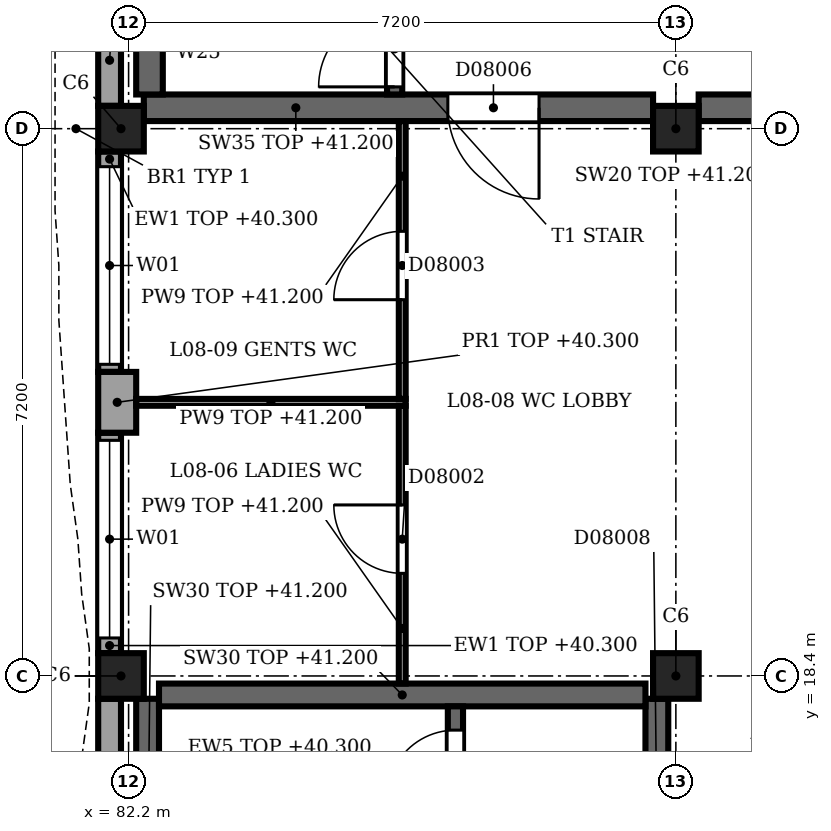
"""IFC4 building model, lengths in metres.
Left out: names, types, materials, properties, quantities, classifications, styles, units other than length and angle.
Written with IfcOpenShell. Run it as: python <this file> out.ifc"""

import sys

from ifc_helpers import new_model, si_unit, direction, frame, frame_2d, origin, origin_2d, place, context, subcontext, project, spatial, rectangle, extrude, element, fill, save


model = new_model("IFC4")
c1 = context("Model", 3, precision=1e-05, world=origin(), true_north=direction((0.0, 1.0)))
c2 = subcontext(c1, "Body", "Model", "MODEL_VIEW")
j1 = project(units=[si_unit("LENGTHUNIT", "METRE"), si_unit("PLANEANGLEUNIT", "RADIAN")], contexts=[c1])
p1 = place(None, origin())
s1 = spatial("IfcSite", under=j1, at=p1, CompositionType="ELEMENT")
p2 = place(p1, origin())
s2 = spatial("IfcBuilding", under=s1, at=p2, CompositionType="ELEMENT")
p3 = place(p2, frame((0.0, 0.0, 36.9)))
s3 = spatial("IfcBuildingStorey", under=s2, at=p3, CompositionType="ELEMENT", Elevation=36.9)
for number, where, z_axis, x_axis in (
    (1, (82.1, 18.4, 0.0), (0.0, 0.0, 1.0), (1.0, 0.0, 0.0)),
    (2, (82.1, 25.6, 0.0), (0.0, 0.0, 1.0), (1.0, 0.0, 0.0)),
    (3, (89.4, 18.4, 0.0), (0.0, 0.0, 1.0), (1.0, 0.0, 0.0)),
    (4, (89.4, 25.6, 0.0), (0.0, 0.0, 1.0), (1.0, 0.0, 0.0)),
):
    element("IfcColumn", number, at=place(p3, frame(where, z_axis=z_axis, x_axis=x_axis)), inside=s3, PredefinedType="COLUMN", context=c2, shape_type="SweptSolid", body=[
        extrude(rectangle(XDim=0.6, YDim=0.6, at=origin_2d()), origin(), (0.0, 0.0, 1.0), 4.5),
    ])
p4 = place(p3, frame((82.05, 21.6, 0.0), z_axis=(0.0, 0.0, 1.0), x_axis=(0.0, 1.0, 0.0)))
e5 = element("IfcWall", 5, at=p4, inside=s3, PredefinedType="SOLIDWALL", context=c2, shape_type="SweptSolid", body=[
    extrude(rectangle(XDim=0.8, YDim=0.5, at=frame_2d((0.4, 0.0))), origin(), (0.0, 0.0, 1.0), 3.4),
])
p5 = place(p3, frame((81.95, 15.2, 0.0), z_axis=(0.0, 0.0, 1.0), x_axis=(0.0, 1.0, 0.0)))
e6 = element("IfcWall", 6, at=p5, inside=s3, PredefinedType="SOLIDWALL", context=c2, shape_type="SweptSolid", body=[
    extrude(rectangle(XDim=2.9, YDim=0.3, at=frame_2d((1.45, 0.0))), origin(), (0.0, 0.0, 1.0), 3.4),
])
p6 = place(p3, frame((81.95, 18.7, 0.0), z_axis=(0.0, 0.0, 1.0), x_axis=(0.0, 1.0, 0.0)))
e7 = element("IfcWall", 7, at=p6, inside=s3, PredefinedType="SOLIDWALL", context=c2, shape_type="SweptSolid", body=[
    extrude(rectangle(XDim=2.9, YDim=0.3, at=frame_2d((1.45, 0.0))), origin(), (0.0, 0.0, 1.0), 3.4),
])
p7 = place(p6, frame((0.2, 0.0, 0.9)))
e8 = element("IfcOpeningElement", 8, at=p7, cuts=e7, PredefinedType="OPENING", context=c2, shape_type="SweptSolid", body=[
    extrude(rectangle(XDim=2.6, YDim=2.4, at=frame_2d((1.3, 1.2))), frame((0.0, 0.16, 0.0), z_axis=(0.0, -1.0, 0.0), x_axis=(1.0, 0.0, 0.0)), (0.0, 0.0, 1.0), 0.32),
])
p8 = place(p3, frame((81.95, 22.4, 0.0), z_axis=(0.0, 0.0, 1.0), x_axis=(0.0, 1.0, 0.0)))
e9 = element("IfcWall", 9, at=p8, inside=s3, PredefinedType="SOLIDWALL", context=c2, shape_type="SweptSolid", body=[
    extrude(rectangle(XDim=2.9, YDim=0.3, at=frame_2d((1.45, 0.0))), origin(), (0.0, 0.0, 1.0), 3.4),
])
p9 = place(p8, frame((0.1, 0.0, 0.9)))
e10 = element("IfcOpeningElement", 10, at=p9, cuts=e9, PredefinedType="OPENING", context=c2, shape_type="SweptSolid", body=[
    extrude(rectangle(XDim=2.6, YDim=2.4, at=frame_2d((1.3, 1.2))), frame((0.0, 0.16, 0.0), z_axis=(0.0, -1.0, 0.0), x_axis=(1.0, 0.0, 0.0)), (0.0, 0.0, 1.0), 0.32),
])
p10 = place(p3, frame((81.95, 25.9, 0.0), z_axis=(0.0, 0.0, 1.0), x_axis=(0.0, 1.0, 0.0)))
e11 = element("IfcWall", 11, at=p10, inside=s3, PredefinedType="SOLIDWALL", context=c2, shape_type="SweptSolid", body=[
    extrude(rectangle(XDim=2.9, YDim=0.3, at=frame_2d((1.45, 0.0))), origin(), (0.0, 0.0, 1.0), 3.4),
])
p11 = place(p10, frame((1.2, 0.0, 1.2)))
e12 = element("IfcOpeningElement", 12, at=p11, cuts=e11, PredefinedType="OPENING", context=c2, shape_type="SweptSolid", body=[
    extrude(rectangle(XDim=0.6, YDim=1.8, at=frame_2d((0.3, 0.9))), frame((0.0, 0.16, 0.0), z_axis=(0.0, -1.0, 0.0), x_axis=(1.0, 0.0, 0.0)), (0.0, 0.0, 1.0), 0.32),
])
p12 = place(p3, frame((82.4, 25.875, 0.0), z_axis=(0.0, 0.0, 1.0), x_axis=(1.0, 0.0, 0.0)))
e13 = element("IfcWall", 13, at=p12, inside=s3, PredefinedType="SHEAR", context=c2, shape_type="SweptSolid", body=[
    extrude(rectangle(XDim=6.7, YDim=0.35, at=frame_2d((3.35, 0.0))), origin(), (0.0, 0.0, 1.0), 4.3),
])
p13 = place(p12, frame((4.0, 0.0, 0.0)))
e14 = element("IfcOpeningElement", 14, at=p13, cuts=e13, PredefinedType="OPENING", context=c2, shape_type="SweptSolid", body=[
    extrude(rectangle(XDim=1.2, YDim=2.1, at=frame_2d((0.6, 1.05))), frame((0.0, 0.185, 0.0), z_axis=(0.0, -1.0, 0.0), x_axis=(1.0, 0.0, 0.0)), (0.0, 0.0, 1.0), 0.37),
])
p14 = place(p3, frame((89.7, 25.875, 0.0), z_axis=(0.0, 0.0, 1.0), x_axis=(1.0, 0.0, 0.0)))
e15 = element("IfcWall", 15, at=p14, inside=s3, PredefinedType="SHEAR", context=c2, shape_type="SweptSolid", body=[
    extrude(rectangle(XDim=6.6, YDim=0.35, at=frame_2d((3.3, 0.0))), origin(), (0.0, 0.0, 1.0), 4.3),
])
p15 = place(p14, frame((2.7, 0.0, 0.0)))
e16 = element("IfcOpeningElement", 16, at=p15, cuts=e15, PredefinedType="OPENING", context=c2, shape_type="SweptSolid", body=[
    extrude(rectangle(XDim=1.8, YDim=2.1, at=frame_2d((0.9, 1.05))), frame((0.0, 0.185, 0.0), z_axis=(0.0, -1.0, 0.0), x_axis=(1.0, 0.0, 0.0)), (0.0, 0.0, 1.0), 0.37),
])
p16 = place(p3, frame((82.475, 26.05, 0.0), z_axis=(0.0, 0.0, 1.0), x_axis=(0.0, 1.0, 0.0)))
e17 = element("IfcWall", 17, at=p16, inside=s3, PredefinedType="SHEAR", context=c2, shape_type="SweptSolid", body=[
    extrude(rectangle(XDim=6.3, YDim=0.35, at=frame_2d((3.15, 0.0))), origin(), (0.0, 0.0, 1.0), 4.3),
])
p17 = place(p16, frame((1.05, 0.0, 1.2)))
e18 = element("IfcOpeningElement", 18, at=p17, cuts=e17, PredefinedType="OPENING", context=c2, shape_type="SweptSolid", body=[
    extrude(rectangle(XDim=0.6, YDim=1.8, at=frame_2d((0.3, 0.9))), frame((0.0, 0.185, 0.0), z_axis=(0.0, -1.0, 0.0), x_axis=(1.0, 0.0, 0.0)), (0.0, 0.0, 1.0), 0.37),
])
p18 = place(p16, frame((4.65, 0.0, 1.2)))
e19 = element("IfcOpeningElement", 19, at=p18, cuts=e17, PredefinedType="OPENING", context=c2, shape_type="SweptSolid", body=[
    extrude(rectangle(XDim=0.6, YDim=1.8, at=frame_2d((0.3, 0.9))), frame((0.0, 0.185, 0.0), z_axis=(0.0, -1.0, 0.0), x_axis=(1.0, 0.0, 0.0)), (0.0, 0.0, 1.0), 0.37),
])
p19 = place(p3, frame((85.7, 26.05, 0.0), z_axis=(0.0, 0.0, 1.0), x_axis=(0.0, 1.0, 0.0)))
e20 = element("IfcWall", 20, at=p19, inside=s3, PredefinedType="SHEAR", context=c2, shape_type="SweptSolid", body=[
    extrude(rectangle(XDim=6.3, YDim=0.2, at=frame_2d((3.15, 0.0))), origin(), (0.0, 0.0, 1.0), 4.3),
])
p20 = place(p19, frame((0.1, 0.0, 0.0)))
e21 = element("IfcOpeningElement", 21, at=p20, cuts=e20, PredefinedType="OPENING", context=c2, shape_type="SweptSolid", body=[
    extrude(rectangle(XDim=1.0, YDim=2.1, at=frame_2d((0.5, 1.05))), frame((0.0, 0.11, 0.0), z_axis=(0.0, -1.0, 0.0), x_axis=(1.0, 0.0, 0.0)), (0.0, 0.0, 1.0), 0.22),
])
p21 = place(p3, frame((89.15, 11.5, 0.0), z_axis=(0.0, 0.0, 1.0), x_axis=(0.0, 1.0, 0.0)))
e22 = element("IfcWall", 22, at=p21, inside=s3, PredefinedType="SHEAR", context=c2, shape_type="SweptSolid", body=[
    extrude(rectangle(XDim=6.6, YDim=0.3, at=frame_2d((3.3, 0.0))), origin(), (0.0, 0.0, 1.0), 4.3),
])
p22 = place(p21, frame((4.3, 0.0, 0.0)))
e23 = element("IfcOpeningElement", 23, at=p22, cuts=e22, PredefinedType="OPENING", context=c2, shape_type="SweptSolid", body=[
    extrude(rectangle(XDim=1.2, YDim=2.1, at=frame_2d((0.6, 1.05))), frame((0.0, 0.16, 0.0), z_axis=(0.0, -1.0, 0.0), x_axis=(1.0, 0.0, 0.0)), (0.0, 0.0, 1.0), 0.32),
])
p23 = place(p3, frame((82.45, 11.5, 0.0), z_axis=(0.0, 0.0, 1.0), x_axis=(0.0, 1.0, 0.0)))
e24 = element("IfcWall", 24, at=p23, inside=s3, PredefinedType="SHEAR", context=c2, shape_type="SweptSolid", body=[
    extrude(rectangle(XDim=6.6, YDim=0.3, at=frame_2d((3.3, 0.0))), origin(), (0.0, 0.0, 1.0), 4.3),
])
p24 = place(p23, frame((1.2, 0.0, 1.2)))
e25 = element("IfcOpeningElement", 25, at=p24, cuts=e24, PredefinedType="OPENING", context=c2, shape_type="SweptSolid", body=[
    extrude(rectangle(XDim=0.6, YDim=1.8, at=frame_2d((0.3, 0.9))), frame((0.0, 0.16, 0.0), z_axis=(0.0, -1.0, 0.0), x_axis=(1.0, 0.0, 0.0)), (0.0, 0.0, 1.0), 0.32),
])
p25 = place(p3, frame((82.6, 18.15, 0.0), z_axis=(0.0, 0.0, 1.0), x_axis=(1.0, 0.0, 0.0)))
e26 = element("IfcWall", 26, at=p25, inside=s3, PredefinedType="SHEAR", context=c2, shape_type="SweptSolid", body=[
    extrude(rectangle(XDim=6.4, YDim=0.3, at=frame_2d((3.2, 0.0))), origin(), (0.0, 0.0, 1.0), 4.3),
])
p26 = place(p3, frame((86.5, 18.0, 0.0), z_axis=(0.0, 0.0, 1.0), x_axis=(0.0, -1.0, 0.0)))
e27 = element("IfcWall", 27, at=p26, inside=s3, PredefinedType="SHEAR", context=c2, shape_type="SweptSolid", body=[
    extrude(rectangle(XDim=3.25, YDim=0.2, at=frame_2d((1.625, 0.0))), origin(), (0.0, 0.0, 1.0), 4.3),
])
p27 = place(p26, frame((2.038, 0.0, 0.0)))
e28 = element("IfcOpeningElement", 28, at=p27, cuts=e27, PredefinedType="OPENING", context=c2, shape_type="SweptSolid", body=[
    extrude(rectangle(XDim=0.9, YDim=2.1, at=frame_2d((0.45, 1.05))), frame((0.0, 0.11, 0.0), z_axis=(0.0, -1.0, 0.0), x_axis=(1.0, 0.0, 0.0)), (0.0, 0.0, 1.0), 0.22),
])
p28 = place(p26, frame((0.312, 0.0, 0.0)))
e29 = element("IfcOpeningElement", 29, at=p28, cuts=e27, PredefinedType="OPENING", context=c2, shape_type="SweptSolid", body=[
    extrude(rectangle(XDim=0.9, YDim=2.1, at=frame_2d((0.45, 1.05))), frame((0.0, 0.11, 0.0), z_axis=(0.0, -1.0, 0.0), x_axis=(1.0, 0.0, 0.0)), (0.0, 0.0, 1.0), 0.22),
])
p29 = place(p3, frame((82.3, 22.0, 0.0), z_axis=(0.0, 0.0, 1.0), x_axis=(1.0, 0.0, 0.0)))
e30 = element("IfcWall", 30, at=p29, inside=s3, PredefinedType="PARTITIONING", context=c2, shape_type="SweptSolid", body=[
    extrude(rectangle(XDim=3.545, YDim=0.09, at=frame_2d((1.772, 0.0))), origin(), (0.0, 0.0, 1.0), 4.3),
])
p30 = place(p3, frame((85.8, 18.3, 0.0), z_axis=(0.0, 0.0, 1.0), x_axis=(0.0, 1.0, 0.0)))
e31 = element("IfcWall", 31, at=p30, inside=s3, PredefinedType="PARTITIONING", context=c2, shape_type="SweptSolid", body=[
    extrude(rectangle(XDim=3.655, YDim=0.09, at=frame_2d((1.828, 0.0))), origin(), (0.0, 0.0, 1.0), 4.3),
])
p31 = place(p30, frame((1.45, 0.0, 0.0)))
e32 = element("IfcOpeningElement", 32, at=p31, cuts=e31, PredefinedType="OPENING", context=c2, shape_type="SweptSolid", body=[
    extrude(rectangle(XDim=0.9, YDim=2.1, at=frame_2d((0.45, 1.05))), frame((0.0, 0.055, 0.0), z_axis=(0.0, -1.0, 0.0), x_axis=(1.0, 0.0, 0.0)), (0.0, 0.0, 1.0), 0.11),
])
p32 = place(p3, frame((85.8, 22.045, 0.0), z_axis=(0.0, 0.0, 1.0), x_axis=(0.0, 1.0, 0.0)))
e33 = element("IfcWall", 33, at=p32, inside=s3, PredefinedType="PARTITIONING", context=c2, shape_type="SweptSolid", body=[
    extrude(rectangle(XDim=3.655, YDim=0.09, at=frame_2d((1.828, 0.0))), origin(), (0.0, 0.0, 1.0), 4.3),
])
p33 = place(p32, frame((1.305, 0.0, 0.0)))
e34 = element("IfcOpeningElement", 34, at=p33, cuts=e33, PredefinedType="OPENING", context=c2, shape_type="SweptSolid", body=[
    extrude(rectangle(XDim=0.9, YDim=2.1, at=frame_2d((0.45, 1.05))), frame((0.0, 0.055, 0.0), z_axis=(0.0, -1.0, 0.0), x_axis=(1.0, 0.0, 0.0)), (0.0, 0.0, 1.0), 0.11),
])
p34 = place(p7, origin())
e35 = element("IfcWindow", 35, at=p34, inside=s3, PartitioningType="SINGLE_PANEL", PredefinedType="WINDOW", context=c2, shape_type="SweptSolid", body=[
    extrude(rectangle(XDim=2.6, YDim=2.4, at=frame_2d((1.3, 1.2))), frame((0.0, 0.03, 0.0), z_axis=(0.0, -1.0, 0.0), x_axis=(1.0, 0.0, 0.0)), (0.0, 0.0, 1.0), 0.06),
])
fill(e8, e35)
p35 = place(p9, origin())
e36 = element("IfcWindow", 36, at=p35, inside=s3, PartitioningType="SINGLE_PANEL", PredefinedType="WINDOW", context=c2, shape_type="SweptSolid", body=[
    extrude(rectangle(XDim=2.6, YDim=2.4, at=frame_2d((1.3, 1.2))), frame((0.0, 0.03, 0.0), z_axis=(0.0, -1.0, 0.0), x_axis=(1.0, 0.0, 0.0)), (0.0, 0.0, 1.0), 0.06),
])
fill(e10, e36)
p36 = place(p13, origin())
e37 = element("IfcDoor", 37, at=p36, inside=s3, OperationType="SINGLE_SWING_RIGHT", PredefinedType="DOOR", context=c2, shape_type="SweptSolid", body=[
    extrude(rectangle(XDim=1.2, YDim=2.1, at=frame_2d((0.6, 1.05))), frame((0.0, 0.025, 0.0), z_axis=(0.0, -1.0, 0.0), x_axis=(1.0, 0.0, 0.0)), (0.0, 0.0, 1.0), 0.05),
])
fill(e14, e37)
p37 = place(p20, origin())
e38 = element("IfcDoor", 38, at=p37, inside=s3, OperationType="SINGLE_SWING_LEFT", PredefinedType="DOOR", context=c2, shape_type="SweptSolid", body=[
    extrude(rectangle(XDim=1.0, YDim=2.1, at=frame_2d((0.5, 1.05))), frame((0.0, 0.025, 0.0), z_axis=(0.0, -1.0, 0.0), x_axis=(1.0, 0.0, 0.0)), (0.0, 0.0, 1.0), 0.05),
])
fill(e21, e38)
p38 = place(p28, origin())
e39 = element("IfcDoor", 39, at=p38, inside=s3, OperationType="SINGLE_SWING_LEFT", PredefinedType="DOOR", context=c2, shape_type="SweptSolid", body=[
    extrude(rectangle(XDim=0.9, YDim=2.1, at=frame_2d((0.45, 1.05))), frame((0.0, 0.025, 0.0), z_axis=(0.0, -1.0, 0.0), x_axis=(1.0, 0.0, 0.0)), (0.0, 0.0, 1.0), 0.05),
])
fill(e29, e39)
p39 = place(p31, origin())
e40 = element("IfcDoor", 40, at=p39, inside=s3, OperationType="SINGLE_SWING_RIGHT", PredefinedType="DOOR", context=c2, shape_type="SweptSolid", body=[
    extrude(rectangle(XDim=0.9, YDim=2.1, at=frame_2d((0.45, 1.05))), frame((0.0, 0.025, 0.0), z_axis=(0.0, -1.0, 0.0), x_axis=(1.0, 0.0, 0.0)), (0.0, 0.0, 1.0), 0.05),
])
fill(e32, e40)
p40 = place(p33, origin())
e41 = element("IfcDoor", 41, at=p40, inside=s3, OperationType="SINGLE_SWING_LEFT", PredefinedType="DOOR", context=c2, shape_type="SweptSolid", body=[
    extrude(rectangle(XDim=0.9, YDim=2.1, at=frame_2d((0.45, 1.05))), frame((0.0, 0.025, 0.0), z_axis=(0.0, -1.0, 0.0), x_axis=(1.0, 0.0, 0.0)), (0.0, 0.0, 1.0), 0.05),
])
fill(e34, e41)
save(model, sys.argv[1])
